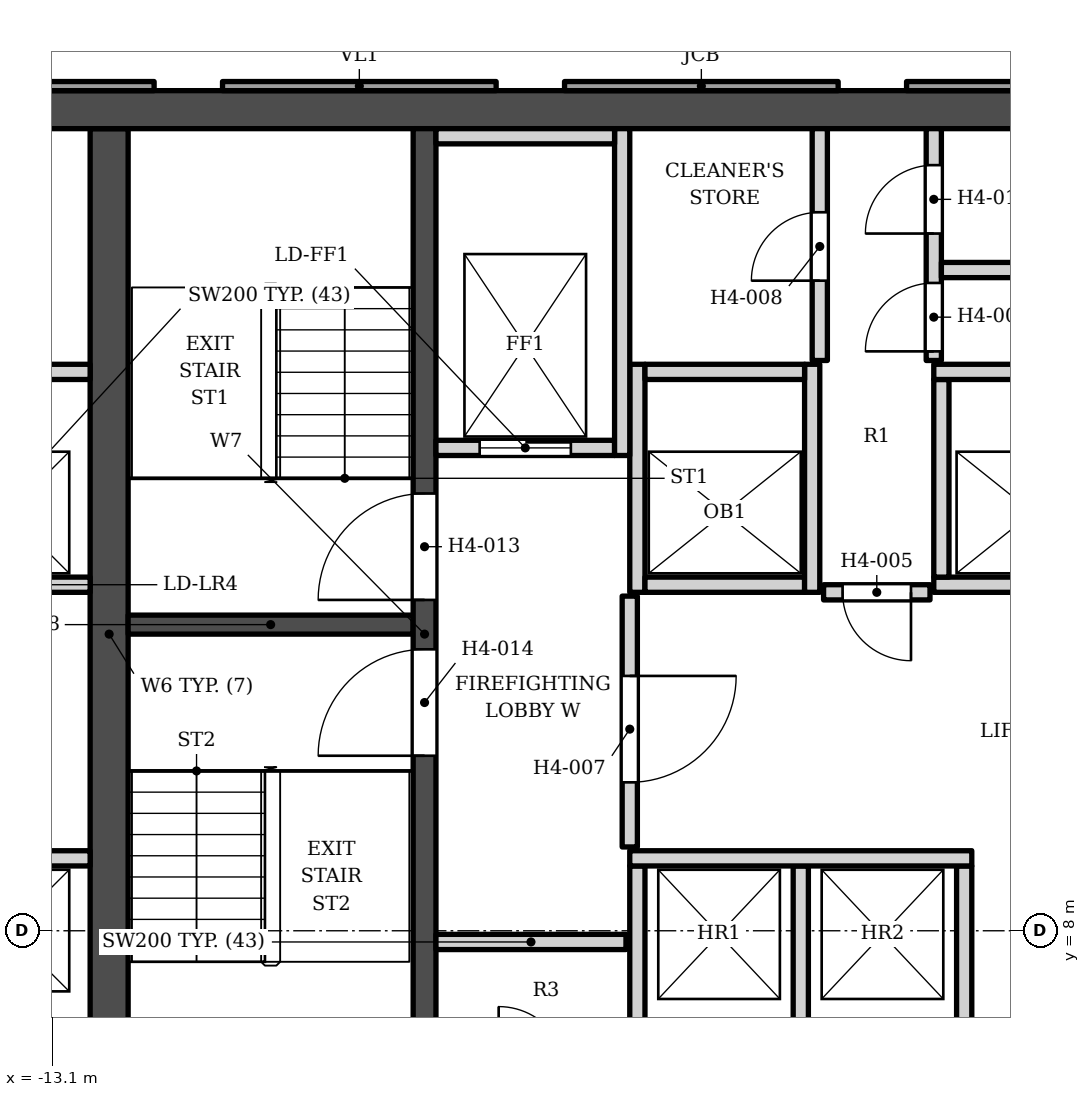
"""IFC4 building model, lengths in metres.
Left out: names, types, materials, properties, quantities, classifications, styles, units other than length and angle.
Written with IfcOpenShell. Run it as: python <this file> out.ifc"""

import sys

from ifc_helpers import new_model, si_unit, direction, frame, frame_2d, origin, place, context, subcontext, project, spatial, polyline, rectangle, outline, extrude, element, fill, save


model = new_model("IFC4")
c1 = context("Model", 3, precision=1e-05, world=origin(), true_north=direction((0.0, 1.0)))
c2 = subcontext(c1, "Body", "Model", "MODEL_VIEW")
j1 = project(units=[si_unit("LENGTHUNIT", "METRE"), si_unit("PLANEANGLEUNIT", "RADIAN")], contexts=[c1])
p1 = place(None, origin())
s1 = spatial("IfcSite", under=j1, at=p1, CompositionType="ELEMENT")
p2 = place(p1, origin())
s2 = spatial("IfcBuilding", under=s1, at=p2, CompositionType="ELEMENT")
p3 = place(p2, frame((0.0, 0.0, 76.6)))
s3 = spatial("IfcBuildingStorey", under=s2, at=p3, CompositionType="ELEMENT", Elevation=76.6)
p4 = place(p3, frame((-16.9, 18.802, 0.0), z_axis=(0.0, 0.0, 1.0), x_axis=(1.0, 0.0, 0.0)))
e1 = element("IfcWall", 1, at=p4, inside=s3, PredefinedType="SHEAR", context=c2, shape_type="SweptSolid", body=[
    extrude(rectangle(XDim=33.8, YDim=0.5, at=frame_2d((16.9, 0.0))), origin(), (0.0, 0.0, 1.0), 3.4),
])
p5 = place(p3, frame((-12.35, 5.253, 0.0), z_axis=(0.0, 0.0, 1.0), x_axis=(0.0, 1.0, 0.0)))
e2 = element("IfcWall", 2, at=p5, inside=s3, PredefinedType="SHEAR", context=c2, shape_type="SweptSolid", body=[
    extrude(rectangle(XDim=13.3, YDim=0.5, at=frame_2d((6.65, 0.0))), origin(), (0.0, 0.0, 1.0), 3.4),
])
p6 = place(p3, frame((-8.2, 5.253, 0.0), z_axis=(0.0, 0.0, 1.0), x_axis=(0.0, 1.0, 0.0)))
e3 = element("IfcWall", 3, at=p6, inside=s3, PredefinedType="SHEAR", context=c2, shape_type="SweptSolid", body=[
    extrude(rectangle(XDim=13.3, YDim=0.3, at=frame_2d((6.65, 0.0))), origin(), (0.0, 0.0, 1.0), 3.4),
])
p7 = place(p6, frame((7.1, 0.0, 0.0)))
e4 = element("IfcOpeningElement", 4, at=p7, cuts=e3, PredefinedType="OPENING", context=c2, shape_type="SweptSolid", body=[
    extrude(rectangle(XDim=1.4, YDim=2.1, at=frame_2d((0.7, 1.05))), frame((0.0, 0.16, 0.0), z_axis=(0.0, -1.0, 0.0), x_axis=(1.0, 0.0, 0.0)), (0.0, 0.0, 1.0), 0.32),
])
p8 = place(p6, frame((5.05, 0.0, 0.0)))
e5 = element("IfcOpeningElement", 5, at=p8, cuts=e3, PredefinedType="OPENING", context=c2, shape_type="SweptSolid", body=[
    extrude(rectangle(XDim=1.4, YDim=2.1, at=frame_2d((0.7, 1.05))), frame((0.0, 0.16, 0.0), z_axis=(0.0, -1.0, 0.0), x_axis=(1.0, 0.0, 0.0)), (0.0, 0.0, 1.0), 0.32),
])
p9 = place(p3, frame((-12.1, 12.028, 0.0), z_axis=(0.0, 0.0, 1.0), x_axis=(1.0, 0.0, 0.0)))
e6 = element("IfcWall", 6, at=p9, inside=s3, PredefinedType="SHEAR", context=c2, shape_type="SweptSolid", body=[
    extrude(rectangle(XDim=3.75, YDim=0.25, at=frame_2d((1.875, 0.0))), origin(), (0.0, 0.0, 1.0), 3.4),
])
p10 = place(p3, origin())
e7 = element("IfcWall", 7, at=p10, inside=s3, PredefinedType="ELEMENTEDWALL", context=c2, shape_type="SweptSolid", body=[
    extrude(outline(polyline([(-1.858, 19.173), (-1.858, 19.052), (1.742, 19.052), (1.742, 19.173), (-1.858, 19.173)])), origin(), (0.0, 0.0, 1.0), 2.65),
])
p11 = place(p3, origin())
e8 = element("IfcWall", 8, at=p11, inside=s3, PredefinedType="SOLIDWALL", context=c2, shape_type="SweptSolid", body=[
    extrude(outline(polyline([(-6.358, 19.173), (-6.358, 19.052), (-2.758, 19.052), (-2.758, 19.173), (-6.358, 19.173)])), origin(), (0.0, 0.0, 1.0), 2.65),
])
p12 = place(p3, origin())
e9 = element("IfcWall", 9, at=p12, inside=s3, PredefinedType="ELEMENTEDWALL", context=c2, shape_type="SweptSolid", body=[
    extrude(outline(polyline([(-10.858, 19.173), (-10.858, 19.052), (-7.258, 19.052), (-7.258, 19.173), (-10.858, 19.173)])), origin(), (0.0, 0.0, 1.0), 2.65),
])
p13 = place(p3, origin())
e10 = element("IfcWall", 10, at=p13, inside=s3, PredefinedType="SOLIDWALL", context=c2, shape_type="SweptSolid", body=[
    extrude(outline(polyline([(-15.358, 19.173), (-15.358, 19.052), (-11.758, 19.052), (-11.758, 19.173), (-15.358, 19.173)])), origin(), (0.0, 0.0, 1.0), 2.65),
])
for number, where, z_axis, x_axis in (
    (11, (-5.4, 6.353, 0.0), (0.0, 0.0, 1.0), (0.0, 1.0, 0.0)),
    (12, (-3.25, 6.353, 0.0), (0.0, 0.0, 1.0), (0.0, 1.0, 0.0)),
    (13, (-1.1, 6.353, 0.0), (0.0, 0.0, 1.0), (0.0, 1.0, 0.0)),
    (14, (-8.05, 7.853, 0.0), (0.0, 0.0, 1.0), (1.0, 0.0, 0.0)),
):
    element("IfcWall", number, at=place(p3, frame(where, z_axis=z_axis, x_axis=x_axis)), inside=s3, PredefinedType="SOLIDWALL", context=c2, shape_type="SweptSolid", body=[
        extrude(rectangle(XDim=2.5, YDim=0.2, at=frame_2d((1.25, 0.0))), origin(), (0.0, 0.0, 1.0), 3.23),
    ])
p14 = place(p3, frame((-16.9, 8.953, 0.0), z_axis=(0.0, 0.0, 1.0), x_axis=(1.0, 0.0, 0.0)))
e15 = element("IfcWall", 15, at=p14, inside=s3, PredefinedType="SOLIDWALL", context=c2, shape_type="SweptSolid", body=[
    extrude(rectangle(XDim=4.3, YDim=0.2, at=frame_2d((2.15, 0.0))), origin(), (0.0, 0.0, 1.0), 3.23),
])
p15 = place(p14, frame((2.675, 0.0, 0.0)))
e16 = element("IfcOpeningElement", 16, at=p15, cuts=e15, PredefinedType="OPENING", context=c2, shape_type="SweptSolid", body=[
    extrude(rectangle(XDim=1.1, YDim=2.1, at=frame_2d((0.55, 1.05))), frame((0.0, 0.11, 0.0), z_axis=(0.0, -1.0, 0.0), x_axis=(1.0, 0.0, 0.0)), (0.0, 0.0, 1.0), 0.22),
])
p16 = place(p14, frame((0.425, 0.0, 0.0)))
e17 = element("IfcOpeningElement", 17, at=p16, cuts=e15, PredefinedType="OPENING", context=c2, shape_type="SweptSolid", body=[
    extrude(rectangle(XDim=1.1, YDim=2.1, at=frame_2d((0.55, 1.05))), frame((0.0, 0.11, 0.0), z_axis=(0.0, -1.0, 0.0), x_axis=(1.0, 0.0, 0.0)), (0.0, 0.0, 1.0), 0.22),
])
p17 = place(p3, frame((-5.5, 8.953, 0.0), z_axis=(0.0, 0.0, 1.0), x_axis=(1.0, 0.0, 0.0)))
e18 = element("IfcWall", 18, at=p17, inside=s3, PredefinedType="SOLIDWALL", context=c2, shape_type="SweptSolid", body=[
    extrude(rectangle(XDim=4.5, YDim=0.2, at=frame_2d((2.25, 0.0))), origin(), (0.0, 0.0, 1.0), 3.23),
])
p18 = place(p3, frame((-5.5, 9.103, 0.0), z_axis=(0.0, 0.0, 1.0), x_axis=(0.0, 1.0, 0.0)))
e19 = element("IfcWall", 19, at=p18, inside=s3, PredefinedType="SOLIDWALL", context=c2, shape_type="SweptSolid", body=[
    extrude(rectangle(XDim=3.3, YDim=0.2, at=frame_2d((1.65, 0.0))), origin(), (0.0, 0.0, 1.0), 3.23),
])
p19 = place(p18, frame((0.85, 0.0, 0.0)))
e20 = element("IfcOpeningElement", 20, at=p19, cuts=e19, PredefinedType="OPENING", context=c2, shape_type="SweptSolid", body=[
    extrude(rectangle(XDim=1.4, YDim=2.1, at=frame_2d((0.7, 1.05))), frame((0.0, 0.11, 0.0), z_axis=(0.0, -1.0, 0.0), x_axis=(1.0, 0.0, 0.0)), (0.0, 0.0, 1.0), 0.22),
])
p20 = place(p3, frame((-2.95, 12.453, 0.0), z_axis=(0.0, 0.0, 1.0), x_axis=(1.0, 0.0, 0.0)))
e21 = element("IfcWall", 21, at=p20, inside=s3, PredefinedType="SOLIDWALL", context=c2, shape_type="SweptSolid", body=[
    extrude(rectangle(XDim=1.4, YDim=0.2, at=frame_2d((0.7, 0.0))), origin(), (0.0, 0.0, 1.0), 3.23),
])
p21 = place(p20, frame((0.25, 0.0, 0.0)))
e22 = element("IfcOpeningElement", 22, at=p21, cuts=e21, PredefinedType="OPENING", context=c2, shape_type="SweptSolid", body=[
    extrude(rectangle(XDim=0.9, YDim=2.1, at=frame_2d((0.45, 1.05))), frame((0.0, 0.11, 0.0), z_axis=(0.0, -1.0, 0.0), x_axis=(1.0, 0.0, 0.0)), (0.0, 0.0, 1.0), 0.22),
])
p22 = place(p3, frame((-16.9, 12.552, 0.0), z_axis=(0.0, 0.0, 1.0), x_axis=(1.0, 0.0, 0.0)))
e23 = element("IfcWall", 23, at=p22, inside=s3, PredefinedType="SOLIDWALL", context=c2, shape_type="SweptSolid", body=[
    extrude(rectangle(XDim=4.3, YDim=0.2, at=frame_2d((2.15, 0.0))), origin(), (0.0, 0.0, 1.0), 3.23),
])
p23 = place(p22, frame((2.675, 0.0, 0.0)))
e24 = element("IfcOpeningElement", 24, at=p23, cuts=e23, PredefinedType="OPENING", context=c2, shape_type="SweptSolid", body=[
    extrude(rectangle(XDim=1.1, YDim=2.1, at=frame_2d((0.55, 1.05))), frame((0.0, 0.11, 0.0), z_axis=(0.0, -1.0, 0.0), x_axis=(1.0, 0.0, 0.0)), (0.0, 0.0, 1.0), 0.22),
])
p24 = place(p22, frame((0.425, 0.0, 0.0)))
e25 = element("IfcOpeningElement", 25, at=p24, cuts=e23, PredefinedType="OPENING", context=c2, shape_type="SweptSolid", body=[
    extrude(rectangle(XDim=1.1, YDim=2.1, at=frame_2d((0.55, 1.05))), frame((0.0, 0.11, 0.0), z_axis=(0.0, -1.0, 0.0), x_axis=(1.0, 0.0, 0.0)), (0.0, 0.0, 1.0), 0.22),
])
p25 = place(p3, frame((-5.4, 12.453, 0.0), z_axis=(0.0, 0.0, 1.0), x_axis=(0.0, 1.0, 0.0)))
e26 = element("IfcWall", 26, at=p25, inside=s3, PredefinedType="SOLIDWALL", context=c2, shape_type="SweptSolid", body=[
    extrude(rectangle(XDim=3.0, YDim=0.2, at=frame_2d((1.5, 0.0))), origin(), (0.0, 0.0, 1.0), 3.23),
])
p26 = place(p3, frame((-5.3, 12.552, 0.0), z_axis=(0.0, 0.0, 1.0), x_axis=(1.0, 0.0, 0.0)))
e27 = element("IfcWall", 27, at=p26, inside=s3, PredefinedType="SOLIDWALL", context=c2, shape_type="SweptSolid", body=[
    extrude(rectangle(XDim=2.1, YDim=0.2, at=frame_2d((1.05, 0.0))), origin(), (0.0, 0.0, 1.0), 3.23),
])
p27 = place(p3, frame((-3.1, 12.453, 0.0), z_axis=(0.0, 0.0, 1.0), x_axis=(0.0, 1.0, 0.0)))
e28 = element("IfcWall", 28, at=p27, inside=s3, PredefinedType="SOLIDWALL", context=c2, shape_type="SweptSolid", body=[
    extrude(rectangle(XDim=3.0, YDim=0.2, at=frame_2d((1.5, 0.0))), origin(), (0.0, 0.0, 1.0), 3.23),
])
p28 = place(p3, frame((-1.5, 12.552, 0.0), z_axis=(0.0, 0.0, 1.0), x_axis=(1.0, 0.0, 0.0)))
e29 = element("IfcWall", 29, at=p28, inside=s3, PredefinedType="SOLIDWALL", context=c2, shape_type="SweptSolid", body=[
    extrude(rectangle(XDim=7.0, YDim=0.2, at=frame_2d((3.5, 0.0))), origin(), (0.0, 0.0, 1.0), 3.23),
])
p29 = place(p3, frame((-1.4, 12.653, 0.0), z_axis=(0.0, 0.0, 1.0), x_axis=(0.0, 1.0, 0.0)))
e30 = element("IfcWall", 30, at=p29, inside=s3, PredefinedType="SOLIDWALL", context=c2, shape_type="SweptSolid", body=[
    extrude(rectangle(XDim=2.6, YDim=0.2, at=frame_2d((1.3, 0.0))), origin(), (0.0, 0.0, 1.0), 3.23),
])
p30 = place(p3, frame((-8.05, 14.353, 0.0), z_axis=(0.0, 0.0, 1.0), x_axis=(1.0, 0.0, 0.0)))
e31 = element("IfcWall", 31, at=p30, inside=s3, PredefinedType="SOLIDWALL", context=c2, shape_type="SweptSolid", body=[
    extrude(rectangle(XDim=2.35, YDim=0.2, at=frame_2d((1.175, 0.0))), origin(), (0.0, 0.0, 1.0), 3.23),
])
p31 = place(p30, frame((0.575, 0.0, 0.0)))
e32 = element("IfcOpeningElement", 32, at=p31, cuts=e31, PredefinedType="OPENING", context=c2, shape_type="SweptSolid", body=[
    extrude(rectangle(XDim=1.2, YDim=2.1, at=frame_2d((0.6, 1.05))), frame((0.0, 0.11, 0.0), z_axis=(0.0, -1.0, 0.0), x_axis=(1.0, 0.0, 0.0)), (0.0, 0.0, 1.0), 0.22),
])
for number, where, z_axis, x_axis in (
    (33, (-5.6, 14.253, 0.0), (0.0, 0.0, 1.0), (0.0, 1.0, 0.0)),
    (34, (-16.9, 15.353, 0.0), (0.0, 0.0, 1.0), (1.0, 0.0, 0.0)),
):
    element("IfcWall", number, at=place(p3, frame(where, z_axis=z_axis, x_axis=x_axis)), inside=s3, PredefinedType="SOLIDWALL", context=c2, shape_type="SweptSolid", body=[
        extrude(rectangle(XDim=4.3, YDim=0.2, at=frame_2d((2.15, 0.0))), origin(), (0.0, 0.0, 1.0), 3.23),
    ])
p32 = place(p3, frame((-5.3, 15.353, 0.0), z_axis=(0.0, 0.0, 1.0), x_axis=(1.0, 0.0, 0.0)))
e35 = element("IfcWall", 35, at=p32, inside=s3, PredefinedType="SOLIDWALL", context=c2, shape_type="SweptSolid", body=[
    extrude(rectangle(XDim=2.1, YDim=0.2, at=frame_2d((1.05, 0.0))), origin(), (0.0, 0.0, 1.0), 3.23),
])
p33 = place(p3, frame((-1.5, 15.353, 0.0), z_axis=(0.0, 0.0, 1.0), x_axis=(1.0, 0.0, 0.0)))
e36 = element("IfcWall", 36, at=p33, inside=s3, PredefinedType="SOLIDWALL", context=c2, shape_type="SweptSolid", body=[
    extrude(rectangle(XDim=7.2, YDim=0.2, at=frame_2d((3.6, 0.0))), origin(), (0.0, 0.0, 1.0), 3.23),
])
p34 = place(p3, frame((-3.0, 15.503, 0.0), z_axis=(0.0, 0.0, 1.0), x_axis=(0.0, 1.0, 0.0)))
e37 = element("IfcWall", 37, at=p34, inside=s3, PredefinedType="SOLIDWALL", context=c2, shape_type="SweptSolid", body=[
    extrude(rectangle(XDim=3.05, YDim=0.2, at=frame_2d((1.525, 0.0))), origin(), (0.0, 0.0, 1.0), 3.23),
])
p35 = place(p34, frame((1.05, 0.0, 0.0)))
e38 = element("IfcOpeningElement", 38, at=p35, cuts=e37, PredefinedType="OPENING", context=c2, shape_type="SweptSolid", body=[
    extrude(rectangle(XDim=0.9, YDim=2.1, at=frame_2d((0.45, 1.05))), frame((0.0, 0.11, 0.0), z_axis=(0.0, -1.0, 0.0), x_axis=(1.0, 0.0, 0.0)), (0.0, 0.0, 1.0), 0.22),
])
p36 = place(p3, frame((-1.5, 15.503, 0.0), z_axis=(0.0, 0.0, 1.0), x_axis=(0.0, 1.0, 0.0)))
e39 = element("IfcWall", 39, at=p36, inside=s3, PredefinedType="SOLIDWALL", context=c2, shape_type="SweptSolid", body=[
    extrude(rectangle(XDim=3.05, YDim=0.2, at=frame_2d((1.525, 0.0))), origin(), (0.0, 0.0, 1.0), 3.23),
])
p37 = place(p36, frame((0.12, 0.0, 0.0)))
e40 = element("IfcOpeningElement", 40, at=p37, cuts=e39, PredefinedType="OPENING", context=c2, shape_type="SweptSolid", body=[
    extrude(rectangle(XDim=0.9, YDim=2.1, at=frame_2d((0.45, 1.05))), frame((0.0, 0.11, 0.0), z_axis=(0.0, -1.0, 0.0), x_axis=(1.0, 0.0, 0.0)), (0.0, 0.0, 1.0), 0.22),
])
p38 = place(p36, frame((1.67, 0.0, 0.0)))
e41 = element("IfcOpeningElement", 41, at=p38, cuts=e39, PredefinedType="OPENING", context=c2, shape_type="SweptSolid", body=[
    extrude(rectangle(XDim=0.9, YDim=2.1, at=frame_2d((0.45, 1.05))), frame((0.0, 0.11, 0.0), z_axis=(0.0, -1.0, 0.0), x_axis=(1.0, 0.0, 0.0)), (0.0, 0.0, 1.0), 0.22),
])
p39 = place(p3, frame((-1.4, 16.693, 0.0), z_axis=(0.0, 0.0, 1.0), x_axis=(1.0, 0.0, 0.0)))
e42 = element("IfcWall", 42, at=p39, inside=s3, PredefinedType="SOLIDWALL", context=c2, shape_type="SweptSolid", body=[
    extrude(rectangle(XDim=6.85, YDim=0.2, at=frame_2d((3.425, 0.0))), origin(), (0.0, 0.0, 1.0), 3.23),
])
p40 = place(p3, frame((-8.05, 18.453, 0.0), z_axis=(0.0, 0.0, 1.0), x_axis=(1.0, 0.0, 0.0)))
e43 = element("IfcWall", 43, at=p40, inside=s3, PredefinedType="SOLIDWALL", context=c2, shape_type="SweptSolid", body=[
    extrude(rectangle(XDim=2.35, YDim=0.2, at=frame_2d((1.175, 0.0))), origin(), (0.0, 0.0, 1.0), 3.23),
])
p41 = place(p31, origin())
e44 = element("IfcDoor", 44, at=p41, inside=s3, OperationType="DOUBLE_DOOR_SLIDING", PredefinedType="DOOR", context=c2, shape_type="SweptSolid", body=[
    extrude(rectangle(XDim=1.2, YDim=2.1, at=frame_2d((0.6, 1.05))), frame((0.0, 0.025, 0.0), z_axis=(0.0, -1.0, 0.0), x_axis=(1.0, 0.0, 0.0)), (0.0, 0.0, 1.0), 0.05),
])
fill(e32, e44)
p42 = place(p7, origin())
e45 = element("IfcDoor", 45, at=p42, inside=s3, OperationType="SINGLE_SWING_LEFT", PredefinedType="DOOR", context=c2, shape_type="SweptSolid", body=[
    extrude(rectangle(XDim=1.4, YDim=2.1, at=frame_2d((0.7, 1.05))), frame((0.0, 0.025, 0.0), z_axis=(0.0, -1.0, 0.0), x_axis=(1.0, 0.0, 0.0)), (0.0, 0.0, 1.0), 0.05),
])
fill(e4, e45)
p43 = place(p8, origin())
e46 = element("IfcDoor", 46, at=p43, inside=s3, OperationType="SINGLE_SWING_LEFT", PredefinedType="DOOR", context=c2, shape_type="SweptSolid", body=[
    extrude(rectangle(XDim=1.4, YDim=2.1, at=frame_2d((0.7, 1.05))), frame((0.0, 0.025, 0.0), z_axis=(0.0, -1.0, 0.0), x_axis=(1.0, 0.0, 0.0)), (0.0, 0.0, 1.0), 0.05),
])
fill(e5, e46)
p44 = place(p21, origin())
e47 = element("IfcDoor", 47, at=p44, inside=s3, OperationType="SINGLE_SWING_RIGHT", PredefinedType="DOOR", context=c2, shape_type="SweptSolid", body=[
    extrude(rectangle(XDim=0.9, YDim=2.1, at=frame_2d((0.45, 1.05))), frame((0.0, 0.025, 0.0), z_axis=(0.0, -1.0, 0.0), x_axis=(1.0, 0.0, 0.0)), (0.0, 0.0, 1.0), 0.05),
])
fill(e22, e47)
p45 = place(p19, origin())
e48 = element("IfcDoor", 48, at=p45, inside=s3, OperationType="SINGLE_SWING_RIGHT", PredefinedType="DOOR", context=c2, shape_type="SweptSolid", body=[
    extrude(rectangle(XDim=1.4, YDim=2.1, at=frame_2d((0.7, 1.05))), frame((0.0, 0.025, 0.0), z_axis=(0.0, -1.0, 0.0), x_axis=(1.0, 0.0, 0.0)), (0.0, 0.0, 1.0), 0.05),
])
fill(e20, e48)
p46 = place(p35, origin())
e49 = element("IfcDoor", 49, at=p46, inside=s3, OperationType="SINGLE_SWING_LEFT", PredefinedType="DOOR", context=c2, shape_type="SweptSolid", body=[
    extrude(rectangle(XDim=0.9, YDim=2.1, at=frame_2d((0.45, 1.05))), frame((0.0, 0.025, 0.0), z_axis=(0.0, -1.0, 0.0), x_axis=(1.0, 0.0, 0.0)), (0.0, 0.0, 1.0), 0.05),
])
fill(e38, e49)
p47 = place(p37, origin())
e50 = element("IfcDoor", 50, at=p47, inside=s3, OperationType="SINGLE_SWING_LEFT", PredefinedType="DOOR", context=c2, shape_type="SweptSolid", body=[
    extrude(rectangle(XDim=0.9, YDim=2.1, at=frame_2d((0.45, 1.05))), frame((0.0, 0.025, 0.0), z_axis=(0.0, -1.0, 0.0), x_axis=(1.0, 0.0, 0.0)), (0.0, 0.0, 1.0), 0.05),
])
fill(e40, e50)
p48 = place(p38, origin())
e51 = element("IfcDoor", 51, at=p48, inside=s3, OperationType="SINGLE_SWING_LEFT", PredefinedType="DOOR", context=c2, shape_type="SweptSolid", body=[
    extrude(rectangle(XDim=0.9, YDim=2.1, at=frame_2d((0.45, 1.05))), frame((0.0, 0.025, 0.0), z_axis=(0.0, -1.0, 0.0), x_axis=(1.0, 0.0, 0.0)), (0.0, 0.0, 1.0), 0.05),
])
fill(e41, e51)
save(model, sys.argv[1])
